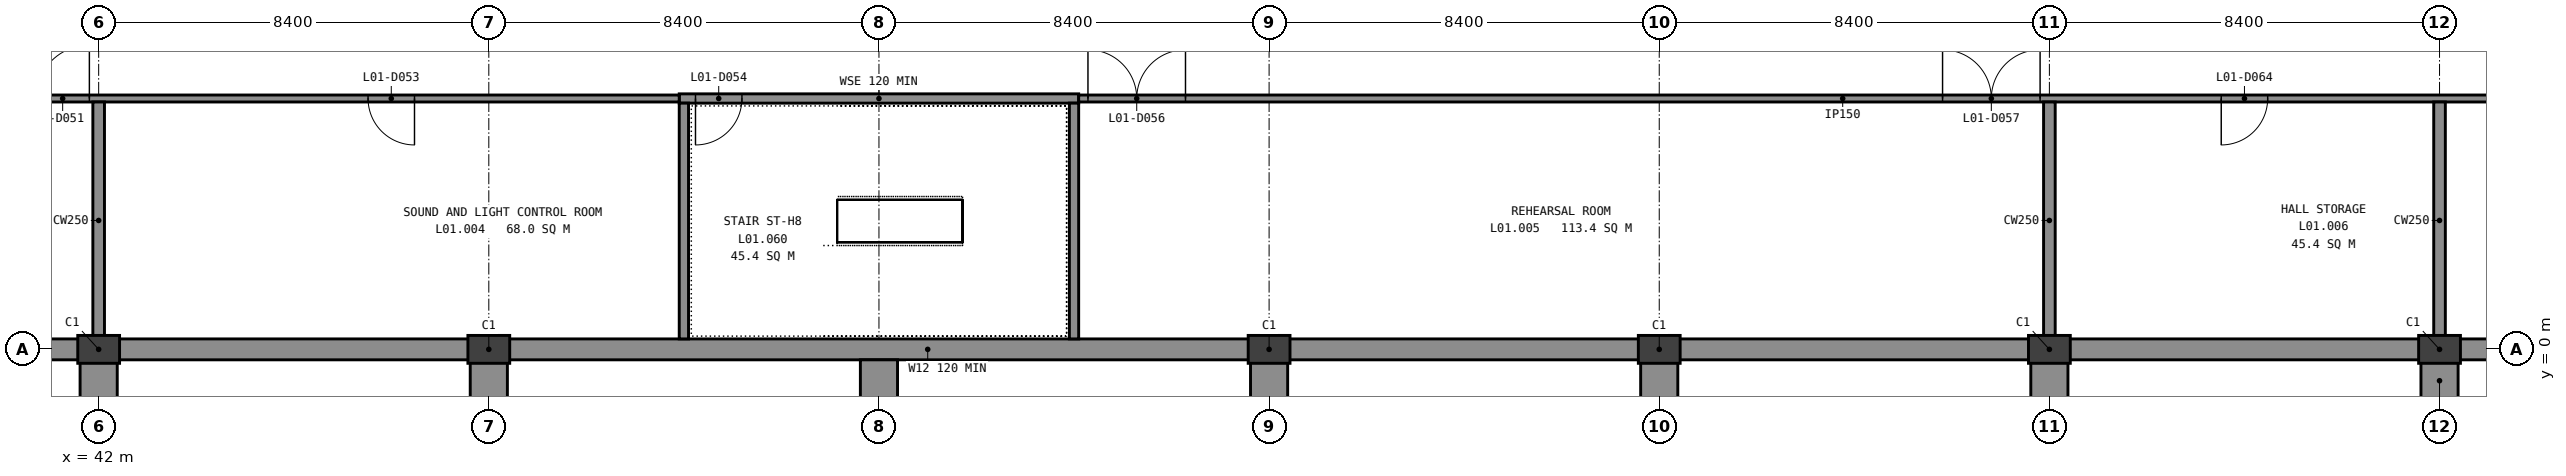
"""IFC4 building model, lengths in metres.
Left out: names, types, materials, properties, quantities, classifications, styles, units other than length and angle.
Written with IfcOpenShell. Run it as: python <this file> out.ifc"""

import sys

from ifc_helpers import new_model, si_unit, direction, frame, frame_2d, origin, origin_2d, place, context, subcontext, project, spatial, rectangle, extrude, element, fill, save


model = new_model("IFC4")
c1 = context("Model", 3, precision=1e-05, world=origin(), true_north=direction((0.0, 1.0)))
c2 = subcontext(c1, "Body", "Model", "MODEL_VIEW")
j1 = project(units=[si_unit("LENGTHUNIT", "METRE"), si_unit("PLANEANGLEUNIT", "RADIAN")], contexts=[c1])
p1 = place(None, origin())
s1 = spatial("IfcSite", under=j1, at=p1, CompositionType="ELEMENT")
p2 = place(p1, origin())
s2 = spatial("IfcBuilding", under=s1, at=p2, CompositionType="ELEMENT")
p3 = place(p2, frame((0.0, 0.0, 5.4)))
s3 = spatial("IfcBuildingStorey", under=s2, at=p3, CompositionType="ELEMENT", Elevation=5.4)
for number, where, z_axis, x_axis in (
    (1, (42.0, 0.0, -0.3), (0.0, 0.0, 1.0), (1.0, 0.0, 0.0)),
    (2, (50.4, 0.0, -0.3), (0.0, 0.0, 1.0), (1.0, 0.0, 0.0)),
    (3, (67.2, 0.0, -0.3), (0.0, 0.0, 1.0), (1.0, 0.0, 0.0)),
    (4, (75.6, 0.0, -0.3), (0.0, 0.0, 1.0), (1.0, 0.0, 0.0)),
    (5, (84.0, 0.0, -0.3), (0.0, 0.0, 1.0), (1.0, 0.0, 0.0)),
    (6, (92.4, 0.0, -0.3), (0.0, 0.0, 1.0), (1.0, 0.0, 0.0)),
):
    element("IfcColumn", number, at=place(p3, frame(where, z_axis=z_axis, x_axis=x_axis)), inside=s3, PredefinedType="PILASTER", context=c2, shape_type="SweptSolid", body=[
        extrude(rectangle(XDim=0.9, YDim=0.6, at=origin_2d()), origin(), (0.0, 0.0, 1.0), 4.55),
    ])
p4 = place(p3, frame((0.0, 0.0, -0.3), z_axis=(0.0, 0.0, 1.0), x_axis=(1.0, 0.0, 0.0)))
e7 = element("IfcWall", 7, at=p4, inside=s3, PredefinedType="SOLIDWALL", context=c2, shape_type="SweptSolid", body=[
    extrude(rectangle(XDim=168.0, YDim=0.45, at=frame_2d((84.0, 0.0))), origin(), (0.0, 0.0, 1.0), 4.55),
])
p5 = place(p4, frame((27.075, 0.0, 1.5)))
e8 = element("IfcOpeningElement", 8, at=p5, cuts=e7, PredefinedType="OPENING", context=c2, shape_type="SweptSolid", body=[
    extrude(rectangle(XDim=0.45, YDim=2.4, at=frame_2d((0.225, 1.2))), frame((0.0, 0.235, 0.0), z_axis=(0.0, -1.0, 0.0), x_axis=(1.0, 0.0, 0.0)), (0.0, 0.0, 1.0), 0.47),
])
p6 = place(p4, frame((31.275, 0.0, 1.5)))
e9 = element("IfcOpeningElement", 9, at=p6, cuts=e7, PredefinedType="OPENING", context=c2, shape_type="SweptSolid", body=[
    extrude(rectangle(XDim=0.45, YDim=2.4, at=frame_2d((0.225, 1.2))), frame((0.0, 0.235, 0.0), z_axis=(0.0, -1.0, 0.0), x_axis=(1.0, 0.0, 0.0)), (0.0, 0.0, 1.0), 0.47),
])
p7 = place(p4, frame((35.475, 0.0, 1.5)))
e10 = element("IfcOpeningElement", 10, at=p7, cuts=e7, PredefinedType="OPENING", context=c2, shape_type="SweptSolid", body=[
    extrude(rectangle(XDim=0.45, YDim=2.4, at=frame_2d((0.225, 1.2))), frame((0.0, 0.235, 0.0), z_axis=(0.0, -1.0, 0.0), x_axis=(1.0, 0.0, 0.0)), (0.0, 0.0, 1.0), 0.47),
])
p8 = place(p4, frame((39.675, 0.0, 1.5)))
e11 = element("IfcOpeningElement", 11, at=p8, cuts=e7, PredefinedType="OPENING", context=c2, shape_type="SweptSolid", body=[
    extrude(rectangle(XDim=0.45, YDim=2.4, at=frame_2d((0.225, 1.2))), frame((0.0, 0.235, 0.0), z_axis=(0.0, -1.0, 0.0), x_axis=(1.0, 0.0, 0.0)), (0.0, 0.0, 1.0), 0.47),
])
p9 = place(p4, frame((94.275, 0.0, 1.5)))
e12 = element("IfcOpeningElement", 12, at=p9, cuts=e7, PredefinedType="OPENING", context=c2, shape_type="SweptSolid", body=[
    extrude(rectangle(XDim=0.45, YDim=2.4, at=frame_2d((0.225, 1.2))), frame((0.0, 0.235, 0.0), z_axis=(0.0, -1.0, 0.0), x_axis=(1.0, 0.0, 0.0)), (0.0, 0.0, 1.0), 0.47),
])
p10 = place(p4, frame((98.475, 0.0, 1.5)))
e13 = element("IfcOpeningElement", 13, at=p10, cuts=e7, PredefinedType="OPENING", context=c2, shape_type="SweptSolid", body=[
    extrude(rectangle(XDim=0.45, YDim=2.4, at=frame_2d((0.225, 1.2))), frame((0.0, 0.235, 0.0), z_axis=(0.0, -1.0, 0.0), x_axis=(1.0, 0.0, 0.0)), (0.0, 0.0, 1.0), 0.47),
])
p11 = place(p4, frame((102.675, 0.0, 1.5)))
e14 = element("IfcOpeningElement", 14, at=p11, cuts=e7, PredefinedType="OPENING", context=c2, shape_type="SweptSolid", body=[
    extrude(rectangle(XDim=0.45, YDim=2.4, at=frame_2d((0.225, 1.2))), frame((0.0, 0.235, 0.0), z_axis=(0.0, -1.0, 0.0), x_axis=(1.0, 0.0, 0.0)), (0.0, 0.0, 1.0), 0.47),
])
p12 = place(p4, frame((106.875, 0.0, 1.5)))
e15 = element("IfcOpeningElement", 15, at=p12, cuts=e7, PredefinedType="OPENING", context=c2, shape_type="SweptSolid", body=[
    extrude(rectangle(XDim=0.45, YDim=2.4, at=frame_2d((0.225, 1.2))), frame((0.0, 0.235, 0.0), z_axis=(0.0, -1.0, 0.0), x_axis=(1.0, 0.0, 0.0)), (0.0, 0.0, 1.0), 0.47),
])
p13 = place(p4, frame((111.075, 0.0, 1.5)))
e16 = element("IfcOpeningElement", 16, at=p13, cuts=e7, PredefinedType="OPENING", context=c2, shape_type="SweptSolid", body=[
    extrude(rectangle(XDim=0.45, YDim=2.4, at=frame_2d((0.225, 1.2))), frame((0.0, 0.235, 0.0), z_axis=(0.0, -1.0, 0.0), x_axis=(1.0, 0.0, 0.0)), (0.0, 0.0, 1.0), 0.47),
])
p14 = place(p4, frame((115.275, 0.0, 1.5)))
e17 = element("IfcOpeningElement", 17, at=p14, cuts=e7, PredefinedType="OPENING", context=c2, shape_type="SweptSolid", body=[
    extrude(rectangle(XDim=0.45, YDim=2.4, at=frame_2d((0.225, 1.2))), frame((0.0, 0.235, 0.0), z_axis=(0.0, -1.0, 0.0), x_axis=(1.0, 0.0, 0.0)), (0.0, 0.0, 1.0), 0.47),
])
p15 = place(p4, frame((127.875, 0.0, 1.5)))
e18 = element("IfcOpeningElement", 18, at=p15, cuts=e7, PredefinedType="OPENING", context=c2, shape_type="SweptSolid", body=[
    extrude(rectangle(XDim=0.45, YDim=2.4, at=frame_2d((0.225, 1.2))), frame((0.0, 0.235, 0.0), z_axis=(0.0, -1.0, 0.0), x_axis=(1.0, 0.0, 0.0)), (0.0, 0.0, 1.0), 0.47),
])
p16 = place(p4, frame((132.075, 0.0, 1.5)))
e19 = element("IfcOpeningElement", 19, at=p16, cuts=e7, PredefinedType="OPENING", context=c2, shape_type="SweptSolid", body=[
    extrude(rectangle(XDim=0.45, YDim=2.4, at=frame_2d((0.225, 1.2))), frame((0.0, 0.235, 0.0), z_axis=(0.0, -1.0, 0.0), x_axis=(1.0, 0.0, 0.0)), (0.0, 0.0, 1.0), 0.47),
])
p17 = place(p4, frame((136.275, 0.0, 1.5)))
e20 = element("IfcOpeningElement", 20, at=p17, cuts=e7, PredefinedType="OPENING", context=c2, shape_type="SweptSolid", body=[
    extrude(rectangle(XDim=0.45, YDim=2.4, at=frame_2d((0.225, 1.2))), frame((0.0, 0.235, 0.0), z_axis=(0.0, -1.0, 0.0), x_axis=(1.0, 0.0, 0.0)), (0.0, 0.0, 1.0), 0.47),
])
p18 = place(p4, frame((140.475, 0.0, 1.5)))
e21 = element("IfcOpeningElement", 21, at=p18, cuts=e7, PredefinedType="OPENING", context=c2, shape_type="SweptSolid", body=[
    extrude(rectangle(XDim=0.45, YDim=2.4, at=frame_2d((0.225, 1.2))), frame((0.0, 0.235, 0.0), z_axis=(0.0, -1.0, 0.0), x_axis=(1.0, 0.0, 0.0)), (0.0, 0.0, 1.0), 0.47),
])
p19 = place(p4, frame((144.675, 0.0, 1.5)))
e22 = element("IfcOpeningElement", 22, at=p19, cuts=e7, PredefinedType="OPENING", context=c2, shape_type="SweptSolid", body=[
    extrude(rectangle(XDim=0.45, YDim=2.4, at=frame_2d((0.225, 1.2))), frame((0.0, 0.235, 0.0), z_axis=(0.0, -1.0, 0.0), x_axis=(1.0, 0.0, 0.0)), (0.0, 0.0, 1.0), 0.47),
])
p20 = place(p4, frame((148.875, 0.0, 1.5)))
e23 = element("IfcOpeningElement", 23, at=p20, cuts=e7, PredefinedType="OPENING", context=c2, shape_type="SweptSolid", body=[
    extrude(rectangle(XDim=0.45, YDim=2.4, at=frame_2d((0.225, 1.2))), frame((0.0, 0.235, 0.0), z_axis=(0.0, -1.0, 0.0), x_axis=(1.0, 0.0, 0.0)), (0.0, 0.0, 1.0), 0.47),
])
p21 = place(p4, frame((153.075, 0.0, 1.5)))
e24 = element("IfcOpeningElement", 24, at=p21, cuts=e7, PredefinedType="OPENING", context=c2, shape_type="SweptSolid", body=[
    extrude(rectangle(XDim=0.45, YDim=2.4, at=frame_2d((0.225, 1.2))), frame((0.0, 0.235, 0.0), z_axis=(0.0, -1.0, 0.0), x_axis=(1.0, 0.0, 0.0)), (0.0, 0.0, 1.0), 0.47),
])
p22 = place(p4, frame((157.275, 0.0, 1.5)))
e25 = element("IfcOpeningElement", 25, at=p22, cuts=e7, PredefinedType="OPENING", context=c2, shape_type="SweptSolid", body=[
    extrude(rectangle(XDim=0.45, YDim=2.4, at=frame_2d((0.225, 1.2))), frame((0.0, 0.235, 0.0), z_axis=(0.0, -1.0, 0.0), x_axis=(1.0, 0.0, 0.0)), (0.0, 0.0, 1.0), 0.47),
])
for number, where, z_axis, x_axis in (
    (26, (42.0, -0.225, -0.3), (0.0, 0.0, 1.0), (0.0, -1.0, 0.0)),
    (27, (50.4, -0.225, -0.3), (0.0, 0.0, 1.0), (0.0, -1.0, 0.0)),
    (28, (58.8, -0.225, -0.3), (0.0, 0.0, 1.0), (0.0, -1.0, 0.0)),
    (29, (67.2, -0.225, -0.3), (0.0, 0.0, 1.0), (0.0, -1.0, 0.0)),
    (30, (75.6, -0.225, -0.3), (0.0, 0.0, 1.0), (0.0, -1.0, 0.0)),
    (31, (84.0, -0.225, -0.3), (0.0, 0.0, 1.0), (0.0, -1.0, 0.0)),
    (32, (92.4, -0.225, -0.3), (0.0, 0.0, 1.0), (0.0, -1.0, 0.0)),
):
    element("IfcWall", number, at=place(p3, frame(where, z_axis=z_axis, x_axis=x_axis)), inside=s3, PredefinedType="SOLIDWALL", context=c2, shape_type="SweptSolid", body=[
        extrude(rectangle(XDim=0.9, YDim=0.8, at=frame_2d((0.45, 0.0))), origin(), (0.0, 0.0, 1.0), 4.55),
    ])
p23 = place(p3, frame((54.5, 5.4, -0.3), z_axis=(0.0, 0.0, 1.0), x_axis=(1.0, 0.0, 0.0)))
e33 = element("IfcWall", 33, at=p23, inside=s3, PredefinedType="SHEAR", context=c2, shape_type="SweptSolid", body=[
    extrude(rectangle(XDim=8.6, YDim=0.2, at=frame_2d((4.3, 0.0))), origin(), (0.0, 0.0, 1.0), 4.5),
])
p24 = place(p23, frame((0.35, 0.0, 0.3)))
e34 = element("IfcOpeningElement", 34, at=p24, cuts=e33, PredefinedType="OPENING", context=c2, shape_type="SweptSolid", body=[
    extrude(rectangle(XDim=1.0, YDim=2.1, at=frame_2d((0.5, 1.05))), frame((0.0, 0.11, 0.0), z_axis=(0.0, -1.0, 0.0), x_axis=(1.0, 0.0, 0.0)), (0.0, 0.0, 1.0), 0.22),
])
for number, where, z_axis, x_axis in (
    (35, (54.6, 0.225, -0.3), (0.0, 0.0, 1.0), (0.0, 1.0, 0.0)),
    (36, (63.0, 0.225, -0.3), (0.0, 0.0, 1.0), (0.0, 1.0, 0.0)),
):
    element("IfcWall", number, at=place(p3, frame(where, z_axis=z_axis, x_axis=x_axis)), inside=s3, PredefinedType="SHEAR", context=c2, shape_type="SweptSolid", body=[
        extrude(rectangle(XDim=5.075, YDim=0.2, at=frame_2d((2.538, 0.0))), origin(), (0.0, 0.0, 1.0), 4.5),
    ])
p25 = place(p3, frame((25.3, 5.4, 0.0), z_axis=(0.0, 0.0, 1.0), x_axis=(1.0, 0.0, 0.0)))
e37 = element("IfcWall", 37, at=p25, inside=s3, PredefinedType="PARTITIONING", context=c2, shape_type="SweptSolid", body=[
    extrude(rectangle(XDim=29.2, YDim=0.15, at=frame_2d((14.6, 0.0))), origin(), (0.0, 0.0, 1.0), 4.2),
])
p26 = place(p25, frame((0.2, 0.0, 0.0)))
e38 = element("IfcOpeningElement", 38, at=p26, cuts=e37, PredefinedType="OPENING", context=c2, shape_type="SweptSolid", body=[
    extrude(rectangle(XDim=1.15, YDim=2.1, at=frame_2d((0.575, 1.05))), frame((0.0, 0.085, 0.0), z_axis=(0.0, -1.0, 0.0), x_axis=(1.0, 0.0, 0.0)), (0.0, 0.0, 1.0), 0.17),
])
p27 = place(p25, frame((15.35, 0.0, 0.0)))
e39 = element("IfcOpeningElement", 39, at=p27, cuts=e37, PredefinedType="OPENING", context=c2, shape_type="SweptSolid", body=[
    extrude(rectangle(XDim=1.15, YDim=2.1, at=frame_2d((0.575, 1.05))), frame((0.0, 0.085, 0.0), z_axis=(0.0, -1.0, 0.0), x_axis=(1.0, 0.0, 0.0)), (0.0, 0.0, 1.0), 0.17),
])
p28 = place(p25, frame((22.5, 0.0, 0.0)))
e40 = element("IfcOpeningElement", 40, at=p28, cuts=e37, PredefinedType="OPENING", context=c2, shape_type="SweptSolid", body=[
    extrude(rectangle(XDim=1.0, YDim=2.1, at=frame_2d((0.5, 1.05))), frame((0.0, 0.085, 0.0), z_axis=(0.0, -1.0, 0.0), x_axis=(1.0, 0.0, 0.0)), (0.0, 0.0, 1.0), 0.17),
])
p29 = place(p3, frame((63.1, 5.4, 0.0), z_axis=(0.0, 0.0, 1.0), x_axis=(1.0, 0.0, 0.0)))
e41 = element("IfcWall", 41, at=p29, inside=s3, PredefinedType="PARTITIONING", context=c2, shape_type="SweptSolid", body=[
    extrude(rectangle(XDim=54.4, YDim=0.15, at=frame_2d((27.2, 0.0))), origin(), (0.0, 0.0, 1.0), 4.2),
])
p30 = place(p29, frame((0.2, 0.0, 0.0)))
e42 = element("IfcOpeningElement", 42, at=p30, cuts=e41, PredefinedType="OPENING", context=c2, shape_type="SweptSolid", body=[
    extrude(rectangle(XDim=2.1, YDim=2.1, at=frame_2d((1.05, 1.05))), frame((0.0, 0.085, 0.0), z_axis=(0.0, -1.0, 0.0), x_axis=(1.0, 0.0, 0.0)), (0.0, 0.0, 1.0), 0.17),
])
p31 = place(p29, frame((18.6, 0.0, 0.0)))
e43 = element("IfcOpeningElement", 43, at=p31, cuts=e41, PredefinedType="OPENING", context=c2, shape_type="SweptSolid", body=[
    extrude(rectangle(XDim=2.1, YDim=2.1, at=frame_2d((1.05, 1.05))), frame((0.0, 0.085, 0.0), z_axis=(0.0, -1.0, 0.0), x_axis=(1.0, 0.0, 0.0)), (0.0, 0.0, 1.0), 0.17),
])
p32 = place(p29, frame((24.6, 0.0, 0.0)))
e44 = element("IfcOpeningElement", 44, at=p32, cuts=e41, PredefinedType="OPENING", context=c2, shape_type="SweptSolid", body=[
    extrude(rectangle(XDim=1.0, YDim=2.1, at=frame_2d((0.5, 1.05))), frame((0.0, 0.085, 0.0), z_axis=(0.0, -1.0, 0.0), x_axis=(1.0, 0.0, 0.0)), (0.0, 0.0, 1.0), 0.17),
])
p33 = place(p29, frame((41.15, 0.0, 0.0)))
e45 = element("IfcOpeningElement", 45, at=p33, cuts=e41, PredefinedType="OPENING", context=c2, shape_type="SweptSolid", body=[
    extrude(rectangle(XDim=1.5, YDim=2.1, at=frame_2d((0.75, 1.05))), frame((0.0, 0.085, 0.0), z_axis=(0.0, -1.0, 0.0), x_axis=(1.0, 0.0, 0.0)), (0.0, 0.0, 1.0), 0.17),
])
p34 = place(p3, frame((42.0, 0.225, 0.0), z_axis=(0.0, 0.0, 1.0), x_axis=(0.0, 1.0, 0.0)))
e46 = element("IfcWall", 46, at=p34, inside=s3, PredefinedType="SOLIDWALL", context=c2, shape_type="SweptSolid", body=[
    extrude(rectangle(XDim=5.1, YDim=0.25, at=frame_2d((2.55, 0.0))), origin(), (0.0, 0.0, 1.0), 3.5),
])
p35 = place(p3, frame((84.0, 0.225, 0.0), z_axis=(0.0, 0.0, 1.0), x_axis=(0.0, 1.0, 0.0)))
e47 = element("IfcWall", 47, at=p35, inside=s3, PredefinedType="SOLIDWALL", context=c2, shape_type="SweptSolid", body=[
    extrude(rectangle(XDim=5.1, YDim=0.25, at=frame_2d((2.55, 0.0))), origin(), (0.0, 0.0, 1.0), 4.2),
])
p36 = place(p3, frame((92.4, 0.225, 0.0), z_axis=(0.0, 0.0, 1.0), x_axis=(0.0, 1.0, 0.0)))
e48 = element("IfcWall", 48, at=p36, inside=s3, PredefinedType="SOLIDWALL", context=c2, shape_type="SweptSolid", body=[
    extrude(rectangle(XDim=5.1, YDim=0.25, at=frame_2d((2.55, 0.0))), origin(), (0.0, 0.0, 1.0), 3.5),
])
p37 = place(p24, origin())
e49 = element("IfcDoor", 49, at=p37, inside=s3, OperationType="SINGLE_SWING_LEFT", PredefinedType="DOOR", context=c2, shape_type="SweptSolid", body=[
    extrude(rectangle(XDim=1.0, YDim=2.1, at=frame_2d((0.5, 1.05))), frame((0.0, 0.025, 0.0), z_axis=(0.0, -1.0, 0.0), x_axis=(1.0, 0.0, 0.0)), (0.0, 0.0, 1.0), 0.05),
])
fill(e34, e49)
p38 = place(p27, origin())
e50 = element("IfcDoor", 50, at=p38, inside=s3, OperationType="SINGLE_SWING_LEFT", PredefinedType="DOOR", context=c2, shape_type="SweptSolid", body=[
    extrude(rectangle(XDim=1.15, YDim=2.1, at=frame_2d((0.575, 1.05))), frame((0.0, 0.025, 0.0), z_axis=(0.0, -1.0, 0.0), x_axis=(1.0, 0.0, 0.0)), (0.0, 0.0, 1.0), 0.05),
])
fill(e39, e50)
p39 = place(p28, origin())
e51 = element("IfcDoor", 51, at=p39, inside=s3, OperationType="SINGLE_SWING_RIGHT", PredefinedType="DOOR", context=c2, shape_type="SweptSolid", body=[
    extrude(rectangle(XDim=1.0, YDim=2.1, at=frame_2d((0.5, 1.05))), frame((0.0, 0.025, 0.0), z_axis=(0.0, -1.0, 0.0), x_axis=(1.0, 0.0, 0.0)), (0.0, 0.0, 1.0), 0.05),
])
fill(e40, e51)
p40 = place(p30, origin())
e52 = element("IfcDoor", 52, at=p40, inside=s3, OperationType="DOUBLE_DOOR_SINGLE_SWING", PredefinedType="DOOR", context=c2, shape_type="SweptSolid", body=[
    extrude(rectangle(XDim=2.1, YDim=2.1, at=frame_2d((1.05, 1.05))), frame((0.0, 0.025, 0.0), z_axis=(0.0, -1.0, 0.0), x_axis=(1.0, 0.0, 0.0)), (0.0, 0.0, 1.0), 0.05),
])
fill(e42, e52)
p41 = place(p31, origin())
e53 = element("IfcDoor", 53, at=p41, inside=s3, OperationType="DOUBLE_DOOR_SINGLE_SWING", PredefinedType="DOOR", context=c2, shape_type="SweptSolid", body=[
    extrude(rectangle(XDim=2.1, YDim=2.1, at=frame_2d((1.05, 1.05))), frame((0.0, 0.025, 0.0), z_axis=(0.0, -1.0, 0.0), x_axis=(1.0, 0.0, 0.0)), (0.0, 0.0, 1.0), 0.05),
])
fill(e43, e53)
p42 = place(p32, origin())
e54 = element("IfcDoor", 54, at=p42, inside=s3, OperationType="SINGLE_SWING_LEFT", PredefinedType="DOOR", context=c2, shape_type="SweptSolid", body=[
    extrude(rectangle(XDim=1.0, YDim=2.1, at=frame_2d((0.5, 1.05))), frame((0.0, 0.025, 0.0), z_axis=(0.0, -1.0, 0.0), x_axis=(1.0, 0.0, 0.0)), (0.0, 0.0, 1.0), 0.05),
])
fill(e44, e54)
save(model, sys.argv[1])
